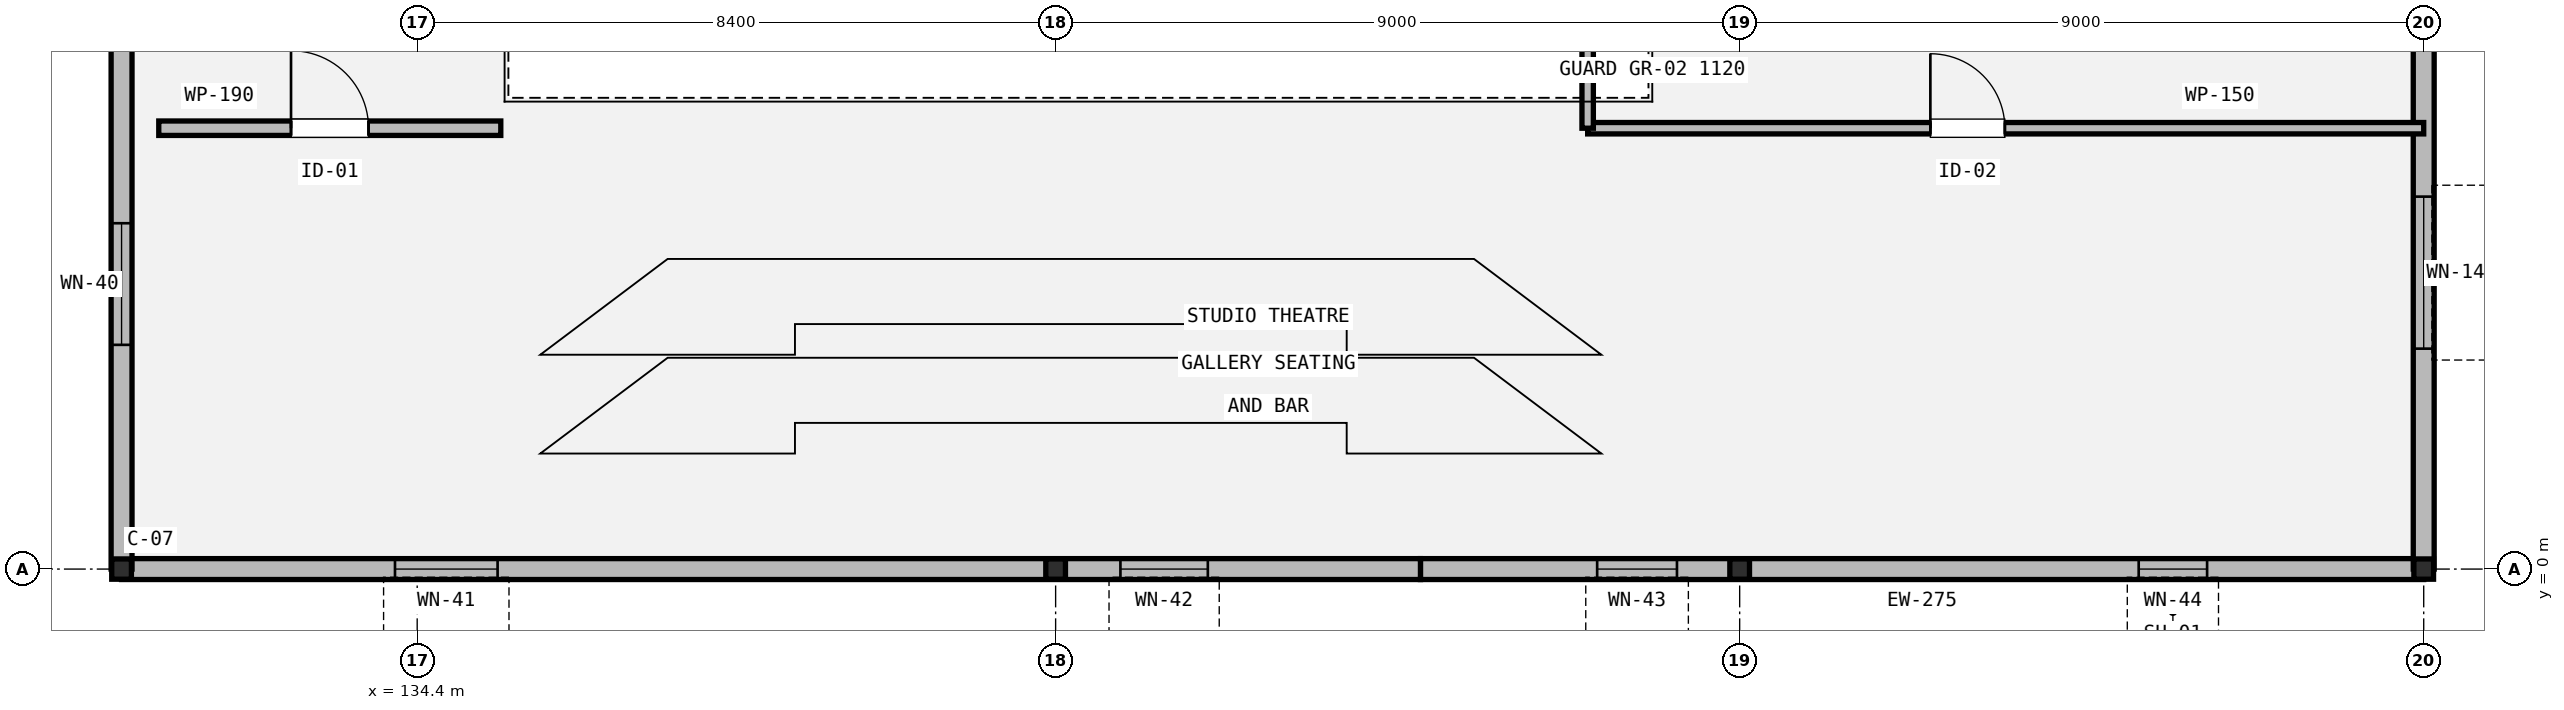
"""IFC4 building model, lengths in metres.
Left out: names, types, materials, properties, quantities, classifications, styles, units other than length and angle.
Written with IfcOpenShell. Run it as: python <this file> out.ifc"""

import sys

from ifc_helpers import new_model, si_unit, direction, frame, frame_2d, origin, origin_2d, place, context, subcontext, project, spatial, rectangle, i_section, extrude, element, fill, save


model = new_model("IFC4")
c1 = context("Model", 3, precision=1e-05, world=origin(), true_north=direction((0.0, 1.0)))
c2 = subcontext(c1, "Body", "Model", "MODEL_VIEW")
j1 = project(units=[si_unit("LENGTHUNIT", "METRE"), si_unit("PLANEANGLEUNIT", "RADIAN")], contexts=[c1])
p1 = place(None, origin())
s1 = spatial("IfcSite", under=j1, at=p1, CompositionType="ELEMENT")
p2 = place(p1, origin())
s2 = spatial("IfcBuilding", under=s1, at=p2, CompositionType="ELEMENT")
p3 = place(p2, frame((0.0, 0.0, 5.4)))
s3 = spatial("IfcBuildingStorey", under=s2, at=p3, CompositionType="ELEMENT", Elevation=5.4)
for number, where, z_axis, x_axis in (
    (1, (130.51, 0.0, 0.0), (0.0, 0.0, 1.0), (1.0, 0.0, 0.0)),
    (2, (142.8, 0.0, 0.0), (0.0, 0.0, 1.0), (1.0, 0.0, 0.0)),
    (3, (151.8, 0.0, 0.0), (0.0, 0.0, 1.0), (1.0, 0.0, 0.0)),
    (4, (160.8, 0.0, 0.0), (0.0, 0.0, 1.0), (1.0, 0.0, 0.0)),
):
    element("IfcColumn", number, at=place(p3, frame(where, z_axis=z_axis, x_axis=x_axis)), inside=s3, PredefinedType="COLUMN", context=c2, shape_type="SweptSolid", body=[
        extrude(i_section(OverallWidth=0.259, OverallDepth=0.267, WebThickness=0.013, FlangeThickness=0.021, FilletRadius=0.013, at=origin_2d()), origin(), (0.0, 0.0, 1.0), 4.8),
    ])
p4 = place(p3, frame((160.8, 0.0, 0.0), z_axis=(0.0, 0.0, 1.0), x_axis=(-1.0, 0.0, 0.0)))
e5 = element("IfcWall", 5, at=p4, inside=s3, PredefinedType="STANDARD", context=c2, shape_type="SweptSolid", body=[
    extrude(rectangle(XDim=13.2, YDim=0.275, at=frame_2d((6.6, 0.0))), origin(), (0.0, 0.0, 1.0), 3.802),
])
p5 = place(p4, frame((2.85, 0.0, 0.9)))
e6 = element("IfcOpeningElement", 6, at=p5, cuts=e5, PredefinedType="OPENING", context=c2, shape_type="SweptSolid", body=[
    extrude(rectangle(XDim=0.9, YDim=1.35, at=frame_2d((0.45, 0.675))), frame((0.0, 0.147, 0.0), z_axis=(0.0, -1.0, 0.0), x_axis=(1.0, 0.0, 0.0)), (0.0, 0.0, 1.0), 0.295),
])
p6 = place(p4, frame((9.825, 0.0, 0.9)))
e7 = element("IfcOpeningElement", 7, at=p6, cuts=e5, PredefinedType="OPENING", context=c2, shape_type="SweptSolid", body=[
    extrude(rectangle(XDim=1.05, YDim=1.35, at=frame_2d((0.525, 0.675))), frame((0.0, 0.147, 0.0), z_axis=(0.0, -1.0, 0.0), x_axis=(1.0, 0.0, 0.0)), (0.0, 0.0, 1.0), 0.295),
])
p7 = place(p3, frame((147.6, 0.0, 0.0), z_axis=(0.0, 0.0, 1.0), x_axis=(-1.0, 0.0, 0.0)))
e8 = element("IfcWall", 8, at=p7, inside=s3, PredefinedType="STANDARD", context=c2, shape_type="SweptSolid", body=[
    extrude(rectangle(XDim=17.09, YDim=0.275, at=frame_2d((8.545, 0.0))), origin(), (0.0, 0.0, 1.0), 3.889),
])
p8 = place(p7, frame((2.797, 0.0, 0.9)))
e9 = element("IfcOpeningElement", 9, at=p8, cuts=e8, PredefinedType="OPENING", context=c2, shape_type="SweptSolid", body=[
    extrude(rectangle(XDim=1.15, YDim=1.4, at=frame_2d((0.575, 0.7))), frame((0.0, 0.147, 0.0), z_axis=(0.0, -1.0, 0.0), x_axis=(1.0, 0.0, 0.0)), (0.0, 0.0, 1.0), 0.295),
])
p9 = place(p7, frame((12.142, 0.0, 0.9)))
e10 = element("IfcOpeningElement", 10, at=p9, cuts=e8, PredefinedType="OPENING", context=c2, shape_type="SweptSolid", body=[
    extrude(rectangle(XDim=1.35, YDim=2.2, at=frame_2d((0.675, 1.1))), frame((0.0, 0.147, 0.0), z_axis=(0.0, -1.0, 0.0), x_axis=(1.0, 0.0, 0.0)), (0.0, 0.0, 1.0), 0.295),
])
p10 = place(p3, frame((130.51, 0.0, 0.0), z_axis=(0.0, 0.0, 1.0), x_axis=(0.0, 1.0, 0.0)))
e11 = element("IfcWall", 11, at=p10, inside=s3, PredefinedType="STANDARD", context=c2, shape_type="SweptSolid", body=[
    extrude(rectangle(XDim=18.6, YDim=0.275, at=frame_2d((9.3, 0.0))), origin(), (0.0, 0.0, 1.0), 3.889),
])
p11 = place(p10, frame((2.95, 0.0, 0.9)))
e12 = element("IfcOpeningElement", 12, at=p11, cuts=e11, PredefinedType="OPENING", context=c2, shape_type="SweptSolid", body=[
    extrude(rectangle(XDim=1.6, YDim=2.2, at=frame_2d((0.8, 1.1))), frame((0.0, 0.147, 0.0), z_axis=(0.0, -1.0, 0.0), x_axis=(1.0, 0.0, 0.0)), (0.0, 0.0, 1.0), 0.295),
])
p12 = place(p10, frame((13.025, 0.0, 0.9)))
e13 = element("IfcOpeningElement", 13, at=p12, cuts=e11, PredefinedType="OPENING", context=c2, shape_type="SweptSolid", body=[
    extrude(rectangle(XDim=1.85, YDim=2.2, at=frame_2d((0.925, 1.1))), frame((0.0, 0.147, 0.0), z_axis=(0.0, -1.0, 0.0), x_axis=(1.0, 0.0, 0.0)), (0.0, 0.0, 1.0), 0.295),
])
p13 = place(p3, frame((160.8, 15.6, 0.0), z_axis=(0.0, 0.0, 1.0), x_axis=(0.0, -1.0, 0.0)))
e14 = element("IfcWall", 14, at=p13, inside=s3, PredefinedType="STANDARD", context=c2, shape_type="SweptSolid", body=[
    extrude(rectangle(XDim=15.6, YDim=0.275, at=frame_2d((7.8, 0.0))), origin(), (0.0, 0.0, 1.0), 3.889),
])
p14 = place(p13, frame((2.7, 0.0, 0.9)))
e15 = element("IfcOpeningElement", 15, at=p14, cuts=e14, PredefinedType="OPENING", context=c2, shape_type="SweptSolid", body=[
    extrude(rectangle(XDim=2.4, YDim=1.8, at=frame_2d((1.2, 0.9))), frame((0.0, 0.147, 0.0), z_axis=(0.0, -1.0, 0.0), x_axis=(1.0, 0.0, 0.0)), (0.0, 0.0, 1.0), 0.295),
])
p15 = place(p13, frame((10.7, 0.0, 0.9)))
e16 = element("IfcOpeningElement", 16, at=p15, cuts=e14, PredefinedType="OPENING", context=c2, shape_type="SweptSolid", body=[
    extrude(rectangle(XDim=2.0, YDim=1.1, at=frame_2d((1.0, 0.55))), frame((0.0, 0.147, 0.0), z_axis=(0.0, -1.0, 0.0), x_axis=(1.0, 0.0, 0.0)), (0.0, 0.0, 1.0), 0.295),
])
p16 = place(p3, frame((131.0, 5.8, 0.0), z_axis=(0.0, 0.0, 1.0), x_axis=(1.0, 0.0, 0.0)))
e17 = element("IfcWall", 17, at=p16, inside=s3, PredefinedType="PARTITIONING", context=c2, shape_type="SweptSolid", body=[
    extrude(rectangle(XDim=4.5, YDim=0.19, at=frame_2d((2.25, 0.0))), origin(), (0.0, 0.0, 1.0), 4.552),
])
p17 = place(p16, frame((1.74, 0.0, 0.0)))
e18 = element("IfcOpeningElement", 18, at=p17, cuts=e17, PredefinedType="OPENING", context=c2, shape_type="SweptSolid", body=[
    extrude(rectangle(XDim=1.02, YDim=2.1, at=frame_2d((0.51, 1.05))), frame((0.0, 0.105, 0.0), z_axis=(0.0, -1.0, 0.0), x_axis=(1.0, 0.0, 0.0)), (0.0, 0.0, 1.0), 0.21),
])
p18 = place(p3, frame((149.8, 5.8, 0.0), z_axis=(0.0, 0.0, 1.0), x_axis=(1.0, 0.0, 0.0)))
e19 = element("IfcWall", 19, at=p18, inside=s3, PredefinedType="PARTITIONING", context=c2, shape_type="SweptSolid", body=[
    extrude(rectangle(XDim=11.0, YDim=0.15, at=frame_2d((5.5, 0.0))), origin(), (0.0, 0.0, 1.0), 3.802),
])
p19 = place(p18, frame((4.509, 0.0, 0.0)))
e20 = element("IfcOpeningElement", 20, at=p19, cuts=e19, PredefinedType="OPENING", context=c2, shape_type="SweptSolid", body=[
    extrude(rectangle(XDim=0.98, YDim=2.1, at=frame_2d((0.49, 1.05))), frame((0.0, 0.085, 0.0), z_axis=(0.0, -1.0, 0.0), x_axis=(1.0, 0.0, 0.0)), (0.0, 0.0, 1.0), 0.17),
])
p20 = place(p3, frame((149.8, 5.8, 0.0), z_axis=(0.0, 0.0, 1.0), x_axis=(0.0, 1.0, 0.0)))
e21 = element("IfcWall", 21, at=p20, inside=s3, PredefinedType="PARTITIONING", context=c2, shape_type="SweptSolid", body=[
    extrude(rectangle(XDim=9.8, YDim=0.15, at=frame_2d((4.9, 0.0))), origin(), (0.0, 0.0, 1.0), 4.552),
])
p21 = place(p5, origin())
e22 = element("IfcWindow", 22, at=p21, inside=s3, PartitioningType="SINGLE_PANEL", PredefinedType="WINDOW", context=c2, shape_type="SweptSolid", body=[
    extrude(rectangle(XDim=0.9, YDim=1.35, at=frame_2d((0.45, 0.675))), frame((0.0, 0.03, 0.0), z_axis=(0.0, -1.0, 0.0), x_axis=(1.0, 0.0, 0.0)), (0.0, 0.0, 1.0), 0.06),
])
fill(e6, e22)
p22 = place(p6, origin())
e23 = element("IfcWindow", 23, at=p22, inside=s3, PartitioningType="SINGLE_PANEL", PredefinedType="WINDOW", context=c2, shape_type="SweptSolid", body=[
    extrude(rectangle(XDim=1.05, YDim=1.35, at=frame_2d((0.525, 0.675))), frame((0.0, 0.03, 0.0), z_axis=(0.0, -1.0, 0.0), x_axis=(1.0, 0.0, 0.0)), (0.0, 0.0, 1.0), 0.06),
])
fill(e7, e23)
p23 = place(p8, origin())
e24 = element("IfcWindow", 24, at=p23, inside=s3, PartitioningType="SINGLE_PANEL", PredefinedType="WINDOW", context=c2, shape_type="SweptSolid", body=[
    extrude(rectangle(XDim=1.15, YDim=1.4, at=frame_2d((0.575, 0.7))), frame((0.0, 0.03, 0.0), z_axis=(0.0, -1.0, 0.0), x_axis=(1.0, 0.0, 0.0)), (0.0, 0.0, 1.0), 0.06),
])
fill(e9, e24)
p24 = place(p9, origin())
e25 = element("IfcWindow", 25, at=p24, inside=s3, PartitioningType="SINGLE_PANEL", PredefinedType="WINDOW", context=c2, shape_type="SweptSolid", body=[
    extrude(rectangle(XDim=1.35, YDim=2.2, at=frame_2d((0.675, 1.1))), frame((0.0, 0.03, 0.0), z_axis=(0.0, -1.0, 0.0), x_axis=(1.0, 0.0, 0.0)), (0.0, 0.0, 1.0), 0.06),
])
fill(e10, e25)
p25 = place(p11, origin())
e26 = element("IfcWindow", 26, at=p25, inside=s3, PartitioningType="SINGLE_PANEL", PredefinedType="WINDOW", context=c2, shape_type="SweptSolid", body=[
    extrude(rectangle(XDim=1.6, YDim=2.2, at=frame_2d((0.8, 1.1))), frame((0.0, 0.03, 0.0), z_axis=(0.0, -1.0, 0.0), x_axis=(1.0, 0.0, 0.0)), (0.0, 0.0, 1.0), 0.06),
])
fill(e12, e26)
p26 = place(p15, origin())
e27 = element("IfcWindow", 27, at=p26, inside=s3, PartitioningType="SINGLE_PANEL", PredefinedType="WINDOW", context=c2, shape_type="SweptSolid", body=[
    extrude(rectangle(XDim=2.0, YDim=1.1, at=frame_2d((1.0, 0.55))), frame((0.0, 0.03, 0.0), z_axis=(0.0, -1.0, 0.0), x_axis=(1.0, 0.0, 0.0)), (0.0, 0.0, 1.0), 0.06),
])
fill(e16, e27)
p27 = place(p17, origin())
e28 = element("IfcDoor", 28, at=p27, inside=s3, OperationType="SINGLE_SWING_LEFT", PredefinedType="DOOR", context=c2, shape_type="SweptSolid", body=[
    extrude(rectangle(XDim=1.02, YDim=2.1, at=frame_2d((0.51, 1.05))), frame((0.0, 0.025, 0.0), z_axis=(0.0, -1.0, 0.0), x_axis=(1.0, 0.0, 0.0)), (0.0, 0.0, 1.0), 0.05),
])
fill(e18, e28)
p28 = place(p19, origin())
e29 = element("IfcDoor", 29, at=p28, inside=s3, OperationType="SINGLE_SWING_LEFT", PredefinedType="DOOR", context=c2, shape_type="SweptSolid", body=[
    extrude(rectangle(XDim=0.98, YDim=2.1, at=frame_2d((0.49, 1.05))), frame((0.0, 0.025, 0.0), z_axis=(0.0, -1.0, 0.0), x_axis=(1.0, 0.0, 0.0)), (0.0, 0.0, 1.0), 0.05),
])
fill(e20, e29)
save(model, sys.argv[1])
